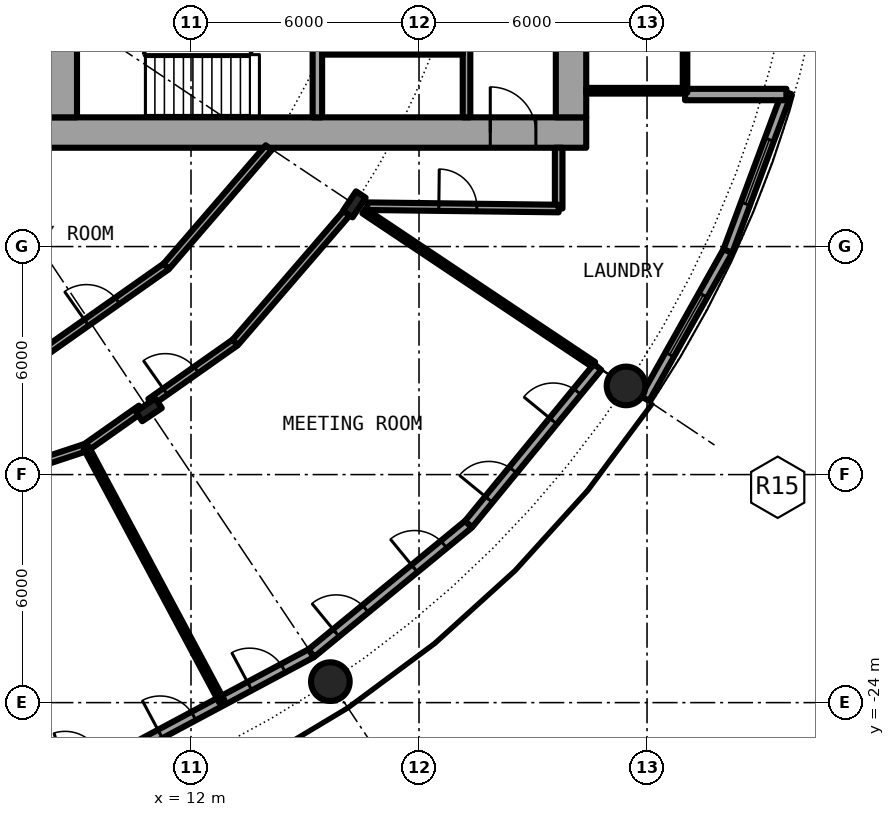
"""IFC4 building model, lengths in metres.
Left out: names, types, materials, properties, quantities, classifications, styles, units other than length and angle.
Written with IfcOpenShell. Run it as: python <this file> out.ifc"""

import sys

from ifc_helpers import new_model, si_unit, direction, frame, frame_2d, origin, origin_2d, place, context, subcontext, project, spatial, rectangle, hollow_circle, i_section, extrude, element, fill, save


model = new_model("IFC4")
c1 = context("Model", 3, precision=1e-05, world=origin(), true_north=direction((0.0, 1.0)))
c2 = subcontext(c1, "Body", "Model", "MODEL_VIEW")
j1 = project(units=[si_unit("LENGTHUNIT", "METRE"), si_unit("PLANEANGLEUNIT", "RADIAN")], contexts=[c1])
p1 = place(None, origin())
s1 = spatial("IfcSite", under=j1, at=p1, CompositionType="ELEMENT")
p2 = place(p1, origin())
s2 = spatial("IfcBuilding", under=s1, at=p2, CompositionType="ELEMENT")
p3 = place(p2, frame((0.0, 0.0, 53.3)))
s3 = spatial("IfcBuildingStorey", under=s2, at=p3, CompositionType="ELEMENT", Elevation=53.3)
for number, where, z_axis, x_axis in (
    (1, (15.667, -23.448, 0.0), (0.0, 0.0, 1.0), (1.0, 0.0, 0.0)),
    (2, (23.448, -15.667, 0.0), (0.0, 0.0, 1.0), (1.0, 0.0, 0.0)),
):
    element("IfcColumn", number, at=place(p3, frame(where, z_axis=z_axis, x_axis=x_axis)), inside=s3, PredefinedType="COLUMN", context=c2, shape_type="SweptSolid", body=[
        extrude(hollow_circle(Radius=0.508, WallThickness=0.05, at=origin_2d()), origin(), (0.0, 0.0, 1.0), 4.2),
    ])
for number, where, z_axis, x_axis in (
    (3, (10.889, -16.297, 0.0), (0.0, 0.0, 1.0), (0.556, -0.831, 0.0)),
    (4, (16.297, -10.889, 0.0), (0.0, 0.0, 1.0), (0.831, -0.556, 0.0)),
):
    element("IfcColumn", number, at=place(p3, frame(where, z_axis=z_axis, x_axis=x_axis)), inside=s3, PredefinedType="COLUMN", context=c2, shape_type="SweptSolid", body=[
        extrude(i_section(OverallWidth=0.305, OverallDepth=0.62, WebThickness=0.021, FlangeThickness=0.04, FilletRadius=0.027, at=origin_2d()), origin(), (0.0, 0.0, 1.0), 4.2),
    ])
p4 = place(p3, frame((10.447, -25.222, 0.0), z_axis=(0.0, 0.0, 1.0), x_axis=(0.881915646801, 0.471407246368, 0.0)))
e5 = element("IfcWall", 5, at=p4, inside=s3, PredefinedType="SOLIDWALL", context=c2, shape_type="SweptSolid", body=[
    extrude(rectangle(XDim=5.352, YDim=0.25, at=frame_2d((2.676, 0.0))), origin(), (0.0, 0.0, 1.0), 3.8),
])
p5 = place(p4, frame((0.841, 0.0, 0.0)))
e6 = element("IfcOpeningElement", 6, at=p5, cuts=e5, PredefinedType="OPENING", context=c2, shape_type="SweptSolid", body=[
    extrude(rectangle(XDim=1.0, YDim=2.2, at=frame_2d((0.5, 1.1))), frame((0.0, 0.135, 0.0), z_axis=(0.0, -1.0, 0.0), x_axis=(1.0, 0.0, 0.0)), (0.0, 0.0, 1.0), 0.27),
])
p6 = place(p4, frame((3.51, 0.0, 0.0)))
e7 = element("IfcOpeningElement", 7, at=p6, cuts=e5, PredefinedType="OPENING", context=c2, shape_type="SweptSolid", body=[
    extrude(rectangle(XDim=1.0, YDim=2.2, at=frame_2d((0.5, 1.1))), frame((0.0, 0.135, 0.0), z_axis=(0.0, -1.0, 0.0), x_axis=(1.0, 0.0, 0.0)), (0.0, 0.0, 1.0), 0.27),
])
p7 = place(p3, frame((15.167, -22.699, 0.0), z_axis=(0.0, 0.0, 1.0), x_axis=(0.773019449054, 0.634382322723, 0.0)))
e8 = element("IfcWall", 8, at=p7, inside=s3, PredefinedType="SOLIDWALL", context=c2, shape_type="SweptSolid", body=[
    extrude(rectangle(XDim=5.352, YDim=0.25, at=frame_2d((2.676, 0.0))), origin(), (0.0, 0.0, 1.0), 3.8),
])
p8 = place(p7, frame((0.841, 0.0, 0.0)))
e9 = element("IfcOpeningElement", 9, at=p8, cuts=e8, PredefinedType="OPENING", context=c2, shape_type="SweptSolid", body=[
    extrude(rectangle(XDim=1.0, YDim=2.2, at=frame_2d((0.5, 1.1))), frame((0.0, 0.135, 0.0), z_axis=(0.0, -1.0, 0.0), x_axis=(1.0, 0.0, 0.0)), (0.0, 0.0, 1.0), 0.27),
])
p9 = place(p7, frame((3.51, 0.0, 0.0)))
e10 = element("IfcOpeningElement", 10, at=p9, cuts=e8, PredefinedType="OPENING", context=c2, shape_type="SweptSolid", body=[
    extrude(rectangle(XDim=1.0, YDim=2.2, at=frame_2d((0.5, 1.1))), frame((0.0, 0.135, 0.0), z_axis=(0.0, -1.0, 0.0), x_axis=(1.0, 0.0, 0.0)), (0.0, 0.0, 1.0), 0.27),
])
p10 = place(p3, frame((19.304, -19.304, 0.0), z_axis=(0.0, 0.0, 1.0), x_axis=(0.634382322723, 0.773019449054, 0.0)))
e11 = element("IfcWall", 11, at=p10, inside=s3, PredefinedType="SOLIDWALL", context=c2, shape_type="SweptSolid", body=[
    extrude(rectangle(XDim=5.352, YDim=0.25, at=frame_2d((2.676, 0.0))), origin(), (0.0, 0.0, 1.0), 3.8),
])
p11 = place(p10, frame((0.841, 0.0, 0.0)))
e12 = element("IfcOpeningElement", 12, at=p11, cuts=e11, PredefinedType="OPENING", context=c2, shape_type="SweptSolid", body=[
    extrude(rectangle(XDim=1.0, YDim=2.2, at=frame_2d((0.5, 1.1))), frame((0.0, 0.135, 0.0), z_axis=(0.0, -1.0, 0.0), x_axis=(1.0, 0.0, 0.0)), (0.0, 0.0, 1.0), 0.27),
])
p12 = place(p10, frame((3.51, 0.0, 0.0)))
e13 = element("IfcOpeningElement", 13, at=p12, cuts=e11, PredefinedType="OPENING", context=c2, shape_type="SweptSolid", body=[
    extrude(rectangle(XDim=1.0, YDim=2.2, at=frame_2d((0.5, 1.1))), frame((0.0, 0.135, 0.0), z_axis=(0.0, -1.0, 0.0), x_axis=(1.0, 0.0, 0.0)), (0.0, 0.0, 1.0), 0.27),
])
p13 = place(p3, frame((23.946, -16.0, 0.0), z_axis=(0.0, 0.0, 1.0), x_axis=(0.489696356642, 0.871893042919, 0.0)))
e14 = element("IfcWall", 14, at=p13, inside=s3, PredefinedType="SOLIDWALL", context=c2, shape_type="SweptSolid", body=[
    extrude(rectangle(XDim=4.454, YDim=0.25, at=frame_2d((2.227, 0.0))), origin(), (0.0, 0.0, 1.0), 3.8),
])
p14 = place(p13, frame((1.327, 0.0, 0.3)))
e15 = element("IfcOpeningElement", 15, at=p14, cuts=e14, PredefinedType="OPENING", context=c2, shape_type="SweptSolid", body=[
    extrude(rectangle(XDim=1.8, YDim=2.1, at=frame_2d((0.9, 1.05))), frame((0.0, 0.135, 0.0), z_axis=(0.0, -1.0, 0.0), x_axis=(1.0, 0.0, 0.0)), (0.0, 0.0, 1.0), 0.27),
])
p15 = place(p3, frame((26.127, -12.117, 0.0), z_axis=(0.0, 0.0, 1.0), x_axis=(0.349247811493, 0.937030397675, 0.0)))
e16 = element("IfcWall", 16, at=p15, inside=s3, PredefinedType="SOLIDWALL", context=c2, shape_type="SweptSolid", body=[
    extrude(rectangle(XDim=4.452, YDim=0.25, at=frame_2d((2.226, 0.0))), origin(), (0.0, 0.0, 1.0), 3.8),
])
p16 = place(p15, frame((1.327, 0.0, 0.3)))
e17 = element("IfcOpeningElement", 17, at=p16, cuts=e16, PredefinedType="OPENING", context=c2, shape_type="SweptSolid", body=[
    extrude(rectangle(XDim=1.8, YDim=2.1, at=frame_2d((0.9, 1.05))), frame((0.0, 0.135, 0.0), z_axis=(0.0, -1.0, 0.0), x_axis=(1.0, 0.0, 0.0)), (0.0, 0.0, 1.0), 0.27),
])
p17 = place(p3, frame((25.0, -8.0, 0.0), z_axis=(0.0, 0.0, 1.0), x_axis=(1.0, 0.0, 0.0)))
e18 = element("IfcWall", 18, at=p17, inside=s3, PredefinedType="SOLIDWALL", context=c2, shape_type="SweptSolid", body=[
    extrude(rectangle(XDim=2.667, YDim=0.3, at=frame_2d((1.333, 0.0))), origin(), (0.0, 0.0, 1.0), 3.8),
])
p18 = place(p3, frame((8.2, -9.0, 0.0), z_axis=(0.0, 0.0, 1.0), x_axis=(1.0, 0.0, 0.0)))
e19 = element("IfcWall", 19, at=p18, inside=s3, PredefinedType="SHEAR", context=c2, shape_type="SweptSolid", body=[
    extrude(rectangle(XDim=14.2, YDim=0.8, at=frame_2d((7.1, 0.0))), origin(), (0.0, 0.0, 1.0), 4.2),
])
p19 = place(p18, frame((11.675, 0.0, 0.0)))
e20 = element("IfcOpeningElement", 20, at=p19, cuts=e19, PredefinedType="OPENING", context=c2, shape_type="SweptSolid", body=[
    extrude(rectangle(XDim=1.2, YDim=2.3, at=frame_2d((0.6, 1.15))), frame((0.0, 0.41, 0.0), z_axis=(0.0, -1.0, 0.0), x_axis=(1.0, 0.0, 0.0)), (0.0, 0.0, 1.0), 0.82),
])
p20 = place(p3, frame((22.0, 8.6, 0.0), z_axis=(0.0, 0.0, 1.0), x_axis=(0.0, -1.0, 0.0)))
e21 = element("IfcWall", 21, at=p20, inside=s3, PredefinedType="SHEAR", context=c2, shape_type="SweptSolid", body=[
    extrude(rectangle(XDim=17.2, YDim=0.8, at=frame_2d((8.6, 0.0))), origin(), (0.0, 0.0, 1.0), 4.2),
])
p21 = place(p20, frame((7.7, 0.0, 0.0)))
e22 = element("IfcOpeningElement", 22, at=p21, cuts=e21, PredefinedType="OPENING", context=c2, shape_type="SweptSolid", body=[
    extrude(rectangle(XDim=1.8, YDim=2.3, at=frame_2d((0.9, 1.15))), frame((0.0, 0.41, 0.0), z_axis=(0.0, -1.0, 0.0), x_axis=(1.0, 0.0, 0.0)), (0.0, 0.0, 1.0), 0.82),
])
p22 = place(p3, frame((8.6, -8.6, 0.0), z_axis=(0.0, 0.0, 1.0), x_axis=(0.0, 1.0, 0.0)))
e23 = element("IfcWall", 23, at=p22, inside=s3, PredefinedType="SHEAR", context=c2, shape_type="SweptSolid", body=[
    extrude(rectangle(XDim=17.2, YDim=0.8, at=frame_2d((8.6, 0.0))), origin(), (0.0, 0.0, 1.0), 4.2),
])
p23 = place(p22, frame((7.4, 0.0, 0.1)))
e24 = element("IfcOpeningElement", 24, at=p23, cuts=e23, PredefinedType="OPENING", context=c2, shape_type="SweptSolid", body=[
    extrude(rectangle(XDim=2.4, YDim=2.2, at=frame_2d((1.2, 1.1))), frame((0.0, 0.41, 0.0), z_axis=(0.0, -1.0, 0.0), x_axis=(1.0, 0.0, 0.0)), (0.0, 0.0, 1.0), 0.82),
])
p24 = place(p3, frame((15.325, -8.6, 0.0), z_axis=(0.0, 0.0, 1.0), x_axis=(0.0, 1.0, 0.0)))
e25 = element("IfcWall", 25, at=p24, inside=s3, PredefinedType="SHEAR", context=c2, shape_type="SweptSolid", body=[
    extrude(rectangle(XDim=3.95, YDim=0.25, at=frame_2d((1.975, 0.0))), origin(), (0.0, 0.0, 1.0), 4.2),
])
p25 = place(p24, frame((2.025, 0.0, 0.0)))
e26 = element("IfcOpeningElement", 26, at=p25, cuts=e25, PredefinedType="OPENING", context=c2, shape_type="SweptSolid", body=[
    extrude(rectangle(XDim=1.2, YDim=2.3, at=frame_2d((0.6, 1.15))), frame((0.0, 0.135, 0.0), z_axis=(0.0, -1.0, 0.0), x_axis=(1.0, 0.0, 0.0)), (0.0, 0.0, 1.0), 0.27),
])
p26 = place(p3, frame((19.25, -8.6, 0.0), z_axis=(0.0, 0.0, 1.0), x_axis=(0.0, 1.0, 0.0)))
e27 = element("IfcWall", 27, at=p26, inside=s3, PredefinedType="SOLIDWALL", context=c2, shape_type="SweptSolid", body=[
    extrude(rectangle(XDim=7.025, YDim=0.2, at=frame_2d((3.513, 0.0))), origin(), (0.0, 0.0, 1.0), 3.8),
])
p27 = place(p26, frame((2.35, 0.0, 0.0)))
e28 = element("IfcOpeningElement", 28, at=p27, cuts=e27, PredefinedType="OPENING", context=c2, shape_type="SweptSolid", body=[
    extrude(rectangle(XDim=1.1, YDim=2.3, at=frame_2d((0.55, 1.15))), frame((0.0, 0.11, 0.0), z_axis=(0.0, -1.0, 0.0), x_axis=(1.0, 0.0, 0.0)), (0.0, 0.0, 1.0), 0.22),
])
p28 = place(p3, frame((15.45, -6.875, 0.0), z_axis=(0.0, 0.0, 1.0), x_axis=(1.0, 0.0, 0.0)))
e29 = element("IfcWall", 29, at=p28, inside=s3, PredefinedType="PARTITIONING", context=c2, shape_type="SweptSolid", body=[
    extrude(rectangle(XDim=3.7, YDim=0.15, at=frame_2d((1.85, 0.0))), origin(), (0.0, 0.0, 1.0), 3.8),
])
p29 = place(p28, frame((1.4, 0.0, 0.0)))
e30 = element("IfcOpeningElement", 30, at=p29, cuts=e29, PredefinedType="OPENING", context=c2, shape_type="SweptSolid", body=[
    extrude(rectangle(XDim=0.9, YDim=2.3, at=frame_2d((0.45, 1.15))), frame((0.0, 0.085, 0.0), z_axis=(0.0, -1.0, 0.0), x_axis=(1.0, 0.0, 0.0)), (0.0, 0.0, 1.0), 0.17),
])
p30 = place(p3, frame((22.4, -7.9, 0.0), z_axis=(0.0, 0.0, 1.0), x_axis=(1.0, 0.0, 0.0)))
e31 = element("IfcWall", 31, at=p30, inside=s3, PredefinedType="PARTITIONING", context=c2, shape_type="SweptSolid", body=[
    extrude(rectangle(XDim=2.54, YDim=0.15, at=frame_2d((1.27, 0.0))), origin(), (0.0, 0.0, 1.0), 3.8),
])
p31 = place(p3, frame((25.0, -7.95, 0.0), z_axis=(0.0, 0.0, 1.0), x_axis=(0.0, 1.0, 0.0)))
e32 = element("IfcWall", 32, at=p31, inside=s3, PredefinedType="PARTITIONING", context=c2, shape_type="SweptSolid", body=[
    extrude(rectangle(XDim=15.9, YDim=0.12, at=frame_2d((7.95, 0.0))), origin(), (0.0, 0.0, 1.0), 3.8),
])
p32 = place(p31, frame((0.95, 0.0, 0.1)))
e33 = element("IfcOpeningElement", 33, at=p32, cuts=e32, PredefinedType="OPENING", context=c2, shape_type="SweptSolid", body=[
    extrude(rectangle(XDim=14.0, YDim=3.0, at=frame_2d((7.0, 1.5))), frame((0.0, 0.07, 0.0), z_axis=(0.0, -1.0, 0.0), x_axis=(1.0, 0.0, 0.0)), (0.0, 0.0, 1.0), 0.14),
])
p33 = place(p3, frame((21.675, -11.0, 0.0), z_axis=(0.0, 0.0, 1.0), x_axis=(0.0, 1.0, 0.0)))
e34 = element("IfcWall", 34, at=p33, inside=s3, PredefinedType="PARTITIONING", context=c2, shape_type="SweptSolid", body=[
    extrude(rectangle(XDim=1.6, YDim=0.2, at=frame_2d((0.8, 0.0))), origin(), (0.0, 0.0, 1.0), 3.8),
])
p34 = place(p3, frame((9.239, -17.286, 0.0), z_axis=(0.0, 0.0, 1.0), x_axis=(0.81766692021, 0.575691590693, 0.0)))
e35 = element("IfcWall", 35, at=p34, inside=s3, PredefinedType="PARTITIONING", context=c2, shape_type="SweptSolid", body=[
    extrude(rectangle(XDim=1.77, YDim=0.2, at=frame_2d((0.885, 0.0))), origin(), (0.0, 0.0, 1.0), 3.48),
])
p35 = place(p3, frame((10.935, -16.091, 0.0), z_axis=(0.0, 0.0, 1.0), x_axis=(0.817764243714, 0.575553335237, 0.0)))
e36 = element("IfcWall", 36, at=p35, inside=s3, PredefinedType="PARTITIONING", context=c2, shape_type="SweptSolid", body=[
    extrude(rectangle(XDim=2.725, YDim=0.2, at=frame_2d((1.362, 0.0))), origin(), (0.0, 0.0, 1.0), 3.48),
])
p36 = place(p35, frame((0.475, 0.0, 0.0)))
e37 = element("IfcOpeningElement", 37, at=p36, cuts=e36, PredefinedType="OPENING", context=c2, shape_type="SweptSolid", body=[
    extrude(rectangle(XDim=1.0, YDim=2.3, at=frame_2d((0.5, 1.15))), frame((0.0, 0.11, 0.0), z_axis=(0.0, -1.0, 0.0), x_axis=(1.0, 0.0, 0.0)), (0.0, 0.0, 1.0), 0.22),
])
p37 = place(p3, frame((13.163, -14.523, 0.0), z_axis=(0.0, 0.0, 1.0), x_axis=(0.653087281304, 0.757282644063, 0.0)))
e38 = element("IfcWall", 38, at=p37, inside=s3, PredefinedType="PARTITIONING", context=c2, shape_type="SweptSolid", body=[
    extrude(rectangle(XDim=4.644, YDim=0.2, at=frame_2d((2.322, 0.0))), origin(), (0.0, 0.0, 1.0), 3.48),
])
p38 = place(p3, frame((3.942, -19.036, 0.0), z_axis=(0.0, 0.0, 1.0), x_axis=(0.949524538902, 0.313692763739, 0.0)))
e39 = element("IfcWall", 39, at=p38, inside=s3, PredefinedType="PARTITIONING", context=c2, shape_type="SweptSolid", body=[
    extrude(rectangle(XDim=5.579, YDim=0.2, at=frame_2d((2.789, 0.0))), origin(), (0.0, 0.0, 1.0), 3.48),
])
p39 = place(p3, frame((7.967, -14.904, 0.0), z_axis=(0.0, 0.0, 1.0), x_axis=(0.817567680547, 0.575832517079, 0.0)))
e40 = element("IfcWall", 40, at=p39, inside=s3, PredefinedType="PARTITIONING", context=c2, shape_type="SweptSolid", body=[
    extrude(rectangle(XDim=4.137, YDim=0.2, at=frame_2d((2.068, 0.0))), origin(), (0.0, 0.0, 1.0), 3.8),
])
p40 = place(p39, frame((1.568, 0.0, 0.0)))
e41 = element("IfcOpeningElement", 41, at=p40, cuts=e40, PredefinedType="OPENING", context=c2, shape_type="SweptSolid", body=[
    extrude(rectangle(XDim=1.0, YDim=2.3, at=frame_2d((0.5, 1.15))), frame((0.0, 0.11, 0.0), z_axis=(0.0, -1.0, 0.0), x_axis=(1.0, 0.0, 0.0)), (0.0, 0.0, 1.0), 0.22),
])
p41 = place(p3, frame((11.349, -12.522, 0.0), z_axis=(0.0, 0.0, 1.0), x_axis=(0.653274518104, 0.757121129012, 0.0)))
e42 = element("IfcWall", 42, at=p41, inside=s3, PredefinedType="PARTITIONING", context=c2, shape_type="SweptSolid", body=[
    extrude(rectangle(XDim=4.124, YDim=0.2, at=frame_2d((2.062, 0.0))), origin(), (0.0, 0.0, 1.0), 3.8),
])
p42 = place(p3, frame((16.637, -10.938, 0.0), z_axis=(0.0, 0.0, 1.0), x_axis=(0.99992425795, -0.012307654658, 0.0)))
e43 = element("IfcWall", 43, at=p42, inside=s3, PredefinedType="PARTITIONING", context=c2, shape_type="SweptSolid", body=[
    extrude(rectangle(XDim=5.039, YDim=0.2, at=frame_2d((2.519, 0.0))), origin(), (0.0, 0.0, 1.0), 3.8),
])
p43 = place(p42, frame((1.884, 0.0, 0.0)))
e44 = element("IfcOpeningElement", 44, at=p43, cuts=e43, PredefinedType="OPENING", context=c2, shape_type="SweptSolid", body=[
    extrude(rectangle(XDim=1.0, YDim=2.3, at=frame_2d((0.5, 1.15))), frame((0.0, 0.11, 0.0), z_axis=(0.0, -1.0, 0.0), x_axis=(1.0, 0.0, 0.0)), (0.0, 0.0, 1.0), 0.22),
])
p44 = place(p3, frame((9.239, -17.286, 0.0), z_axis=(0.0, 0.0, 1.0), x_axis=(0.471439510802, -0.881898399848, 0.0)))
e45 = element("IfcWall", 45, at=p44, inside=s3, PredefinedType="PARTITIONING", context=c2, shape_type="SweptSolid", body=[
    extrude(rectangle(XDim=7.575, YDim=0.15, at=frame_2d((3.787, 0.0))), origin(), (0.0, 0.0, 1.0), 3.8),
])
p45 = place(p3, frame((16.552, -11.065, 0.0), z_axis=(0.0, 0.0, 1.0), x_axis=(0.831491533374, -0.555537424416, 0.0)))
e46 = element("IfcWall", 46, at=p45, inside=s3, PredefinedType="PARTITIONING", context=c2, shape_type="SweptSolid", body=[
    extrude(rectangle(XDim=7.265, YDim=0.15, at=frame_2d((3.633, 0.0))), origin(), (0.0, 0.0, 1.0), 3.8),
])
p46 = place(p5, origin())
e47 = element("IfcDoor", 47, at=p46, inside=s3, OperationType="SINGLE_SWING_LEFT", PredefinedType="DOOR", context=c2, shape_type="SweptSolid", body=[
    extrude(rectangle(XDim=1.0, YDim=2.2, at=frame_2d((0.5, 1.1))), frame((0.0, 0.025, 0.0), z_axis=(0.0, -1.0, 0.0), x_axis=(1.0, 0.0, 0.0)), (0.0, 0.0, 1.0), 0.05),
])
fill(e6, e47)
p47 = place(p6, origin())
e48 = element("IfcDoor", 48, at=p47, inside=s3, OperationType="SINGLE_SWING_LEFT", PredefinedType="DOOR", context=c2, shape_type="SweptSolid", body=[
    extrude(rectangle(XDim=1.0, YDim=2.2, at=frame_2d((0.5, 1.1))), frame((0.0, 0.025, 0.0), z_axis=(0.0, -1.0, 0.0), x_axis=(1.0, 0.0, 0.0)), (0.0, 0.0, 1.0), 0.05),
])
fill(e7, e48)
p48 = place(p8, origin())
e49 = element("IfcDoor", 49, at=p48, inside=s3, OperationType="SINGLE_SWING_LEFT", PredefinedType="DOOR", context=c2, shape_type="SweptSolid", body=[
    extrude(rectangle(XDim=1.0, YDim=2.2, at=frame_2d((0.5, 1.1))), frame((0.0, 0.025, 0.0), z_axis=(0.0, -1.0, 0.0), x_axis=(1.0, 0.0, 0.0)), (0.0, 0.0, 1.0), 0.05),
])
fill(e9, e49)
p49 = place(p9, origin())
e50 = element("IfcDoor", 50, at=p49, inside=s3, OperationType="SINGLE_SWING_LEFT", PredefinedType="DOOR", context=c2, shape_type="SweptSolid", body=[
    extrude(rectangle(XDim=1.0, YDim=2.2, at=frame_2d((0.5, 1.1))), frame((0.0, 0.025, 0.0), z_axis=(0.0, -1.0, 0.0), x_axis=(1.0, 0.0, 0.0)), (0.0, 0.0, 1.0), 0.05),
])
fill(e10, e50)
p50 = place(p11, origin())
e51 = element("IfcDoor", 51, at=p50, inside=s3, OperationType="SINGLE_SWING_LEFT", PredefinedType="DOOR", context=c2, shape_type="SweptSolid", body=[
    extrude(rectangle(XDim=1.0, YDim=2.2, at=frame_2d((0.5, 1.1))), frame((0.0, 0.025, 0.0), z_axis=(0.0, -1.0, 0.0), x_axis=(1.0, 0.0, 0.0)), (0.0, 0.0, 1.0), 0.05),
])
fill(e12, e51)
p51 = place(p12, origin())
e52 = element("IfcDoor", 52, at=p51, inside=s3, OperationType="SINGLE_SWING_LEFT", PredefinedType="DOOR", context=c2, shape_type="SweptSolid", body=[
    extrude(rectangle(XDim=1.0, YDim=2.2, at=frame_2d((0.5, 1.1))), frame((0.0, 0.025, 0.0), z_axis=(0.0, -1.0, 0.0), x_axis=(1.0, 0.0, 0.0)), (0.0, 0.0, 1.0), 0.05),
])
fill(e13, e52)
p52 = place(p14, origin())
e53 = element("IfcWindow", 53, at=p52, inside=s3, PartitioningType="SINGLE_PANEL", PredefinedType="WINDOW", context=c2, shape_type="SweptSolid", body=[
    extrude(rectangle(XDim=1.8, YDim=2.1, at=frame_2d((0.9, 1.05))), frame((0.0, 0.03, 0.0), z_axis=(0.0, -1.0, 0.0), x_axis=(1.0, 0.0, 0.0)), (0.0, 0.0, 1.0), 0.06),
])
fill(e15, e53)
p53 = place(p16, origin())
e54 = element("IfcWindow", 54, at=p53, inside=s3, PartitioningType="SINGLE_PANEL", PredefinedType="WINDOW", context=c2, shape_type="SweptSolid", body=[
    extrude(rectangle(XDim=1.8, YDim=2.1, at=frame_2d((0.9, 1.05))), frame((0.0, 0.03, 0.0), z_axis=(0.0, -1.0, 0.0), x_axis=(1.0, 0.0, 0.0)), (0.0, 0.0, 1.0), 0.06),
])
fill(e17, e54)
p54 = place(p29, origin())
e55 = element("IfcDoor", 55, at=p54, inside=s3, OperationType="SINGLE_SWING_LEFT", PredefinedType="DOOR", context=c2, shape_type="SweptSolid", body=[
    extrude(rectangle(XDim=0.9, YDim=2.3, at=frame_2d((0.45, 1.15))), frame((0.0, 0.025, 0.0), z_axis=(0.0, -1.0, 0.0), x_axis=(1.0, 0.0, 0.0)), (0.0, 0.0, 1.0), 0.05),
])
fill(e30, e55)
p55 = place(p19, origin())
e56 = element("IfcDoor", 56, at=p55, inside=s3, OperationType="SINGLE_SWING_LEFT", PredefinedType="DOOR", context=c2, shape_type="SweptSolid", body=[
    extrude(rectangle(XDim=1.2, YDim=2.3, at=frame_2d((0.6, 1.15))), frame((0.0, 0.025, 0.0), z_axis=(0.0, -1.0, 0.0), x_axis=(1.0, 0.0, 0.0)), (0.0, 0.0, 1.0), 0.05),
])
fill(e20, e56)
p56 = place(p32, origin())
e57 = element("IfcWindow", 57, at=p56, inside=s3, PartitioningType="SINGLE_PANEL", PredefinedType="WINDOW", context=c2, shape_type="SweptSolid", body=[
    extrude(rectangle(XDim=14.0, YDim=3.0, at=frame_2d((7.0, 1.5))), frame((0.0, 0.03, 0.0), z_axis=(0.0, -1.0, 0.0), x_axis=(1.0, 0.0, 0.0)), (0.0, 0.0, 1.0), 0.06),
])
fill(e33, e57)
p57 = place(p36, origin())
e58 = element("IfcDoor", 58, at=p57, inside=s3, OperationType="SINGLE_SWING_LEFT", PredefinedType="DOOR", context=c2, shape_type="SweptSolid", body=[
    extrude(rectangle(XDim=1.0, YDim=2.3, at=frame_2d((0.5, 1.15))), frame((0.0, 0.025, 0.0), z_axis=(0.0, -1.0, 0.0), x_axis=(1.0, 0.0, 0.0)), (0.0, 0.0, 1.0), 0.05),
])
fill(e37, e58)
p58 = place(p40, origin())
e59 = element("IfcDoor", 59, at=p58, inside=s3, OperationType="SINGLE_SWING_RIGHT", PredefinedType="DOOR", context=c2, shape_type="SweptSolid", body=[
    extrude(rectangle(XDim=1.0, YDim=2.3, at=frame_2d((0.5, 1.15))), frame((0.0, 0.025, 0.0), z_axis=(0.0, -1.0, 0.0), x_axis=(1.0, 0.0, 0.0)), (0.0, 0.0, 1.0), 0.05),
])
fill(e41, e59)
p59 = place(p43, origin())
e60 = element("IfcDoor", 60, at=p59, inside=s3, OperationType="SINGLE_SWING_LEFT", PredefinedType="DOOR", context=c2, shape_type="SweptSolid", body=[
    extrude(rectangle(XDim=1.0, YDim=2.3, at=frame_2d((0.5, 1.15))), frame((0.0, 0.025, 0.0), z_axis=(0.0, -1.0, 0.0), x_axis=(1.0, 0.0, 0.0)), (0.0, 0.0, 1.0), 0.05),
])
fill(e44, e60)
save(model, sys.argv[1])
